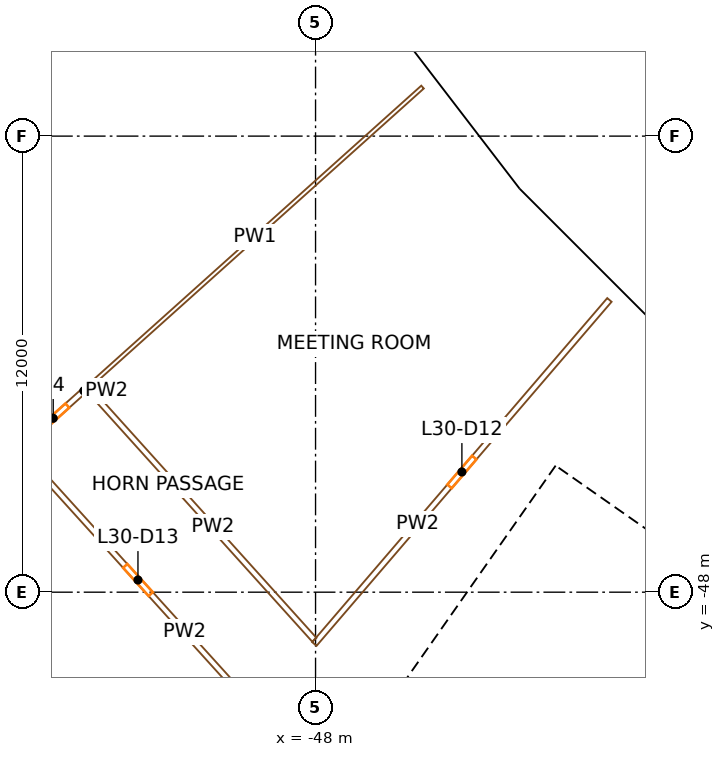
"""IFC4 building model, lengths in metres.
Left out: names, types, materials, properties, quantities, classifications, styles, units other than length and angle.
Written with IfcOpenShell. Run it as: python <this file> out.ifc"""

import sys

from ifc_helpers import new_model, si_unit, direction, frame, frame_2d, origin, origin_2d, place, context, subcontext, project, spatial, rectangle, extrude, element, fill, save


model = new_model("IFC4")
c1 = context("Model", 3, precision=1e-05, world=origin(), true_north=direction((0.0, 1.0)))
c2 = subcontext(c1, "Body", "Model", "MODEL_VIEW")
j1 = project(units=[si_unit("LENGTHUNIT", "METRE"), si_unit("PLANEANGLEUNIT", "RADIAN")], contexts=[c1])
p1 = place(None, origin())
s1 = spatial("IfcSite", under=j1, at=p1, CompositionType="ELEMENT")
p2 = place(p1, origin())
s2 = spatial("IfcBuilding", under=s1, at=p2, CompositionType="ELEMENT")
p3 = place(p2, frame((0.0, 0.0, 132.9)))
s3 = spatial("IfcBuildingStorey", under=s2, at=p3, CompositionType="ELEMENT", Elevation=132.9)
for number, where, z_axis, x_axis in (
    (1, (-43.795, -38.407, 0.0), (0.0, 0.0, 1.0), (0.659, -0.752, 0.0)),
    (2, (-38.407, -43.795, 0.0), (0.0, 0.0, 1.0), (0.752, -0.659, 0.0)),
):
    element("IfcColumn", number, at=place(p3, frame(where, z_axis=z_axis, x_axis=x_axis)), inside=s3, PredefinedType="COLUMN", context=c2, shape_type="SweptSolid", body=[
        extrude(rectangle(XDim=1.2, YDim=1.5, at=origin_2d()), origin(), (0.0, 0.0, 1.0), 3.8),
    ])
p4 = place(p3, frame((-49.779, -57.191, 0.0), z_axis=(0.0, 0.0, 1.0), x_axis=(0.573577477574, 0.819151315216, 0.0)))
e3 = element("IfcWall", 3, at=p4, inside=s3, PredefinedType="SHEAR", context=c2, shape_type="SweptSolid", body=[
    extrude(rectangle(XDim=14.8, YDim=0.9, at=frame_2d((7.4, 0.0))), origin(), (0.0, 0.0, 1.0), 3.5),
])
p5 = place(p4, frame((6.7, 0.0, 0.0)))
e4 = element("IfcOpeningElement", 4, at=p5, cuts=e3, PredefinedType="OPENING", context=c2, shape_type="SweptSolid", body=[
    extrude(rectangle(XDim=1.4, YDim=2.1, at=frame_2d((0.7, 1.05))), frame((0.0, 0.46, 0.0), z_axis=(0.0, -1.0, 0.0), x_axis=(1.0, 0.0, 0.0)), (0.0, 0.0, 1.0), 0.92),
])
p6 = place(p3, frame((-28.854, -54.324, 0.0), z_axis=(0.0, 0.0, 1.0), x_axis=(-0.819145767589, 0.573585400304, 0.0)))
e5 = element("IfcWall", 5, at=p6, inside=s3, PredefinedType="SHEAR", context=c2, shape_type="SweptSolid", body=[
    extrude(rectangle(XDim=15.045, YDim=0.9, at=frame_2d((7.523, 0.0))), origin(), (0.0, 0.0, 1.0), 3.5),
])
p7 = place(p6, frame((0.5, 0.0, 0.0)))
e6 = element("IfcOpeningElement", 6, at=p7, cuts=e5, PredefinedType="OPENING", context=c2, shape_type="SweptSolid", body=[
    extrude(rectangle(XDim=1.0, YDim=2.1, at=frame_2d((0.5, 1.05))), frame((0.0, 0.46, 0.0), z_axis=(0.0, -1.0, 0.0), x_axis=(1.0, 0.0, 0.0)), (0.0, 0.0, 1.0), 0.92),
])
p8 = place(p6, frame((2.625, 0.0, 0.0)))
e7 = element("IfcOpeningElement", 7, at=p8, cuts=e5, PredefinedType="OPENING", context=c2, shape_type="SweptSolid", body=[
    extrude(rectangle(XDim=1.0, YDim=2.1, at=frame_2d((0.5, 1.05))), frame((0.0, 0.46, 0.0), z_axis=(0.0, -1.0, 0.0), x_axis=(1.0, 0.0, 0.0)), (0.0, 0.0, 1.0), 0.92),
])
p9 = place(p6, frame((5.625, 0.0, 0.0)))
e8 = element("IfcOpeningElement", 8, at=p9, cuts=e5, PredefinedType="OPENING", context=c2, shape_type="SweptSolid", body=[
    extrude(rectangle(XDim=0.9, YDim=2.1, at=frame_2d((0.45, 1.05))), frame((0.0, 0.46, 0.0), z_axis=(0.0, -1.0, 0.0), x_axis=(1.0, 0.0, 0.0)), (0.0, 0.0, 1.0), 0.92),
])
p10 = place(p6, frame((13.495, 0.0, 0.0)))
e9 = element("IfcOpeningElement", 9, at=p10, cuts=e5, PredefinedType="OPENING", context=c2, shape_type="SweptSolid", body=[
    extrude(rectangle(XDim=1.1, YDim=2.1, at=frame_2d((0.55, 1.05))), frame((0.0, 0.46, 0.0), z_axis=(0.0, -1.0, 0.0), x_axis=(1.0, 0.0, 0.0)), (0.0, 0.0, 1.0), 0.92),
])
p11 = place(p3, frame((-43.204, -60.696, 0.0), z_axis=(0.0, 0.0, 1.0), x_axis=(0.573571992966, 0.819155155563, 0.0)))
e10 = element("IfcWall", 10, at=p11, inside=s3, PredefinedType="SOLIDWALL", context=c2, shape_type="SweptSolid", body=[
    extrude(rectangle(XDim=13.0, YDim=0.3, at=frame_2d((6.5, 0.0))), origin(), (0.0, 0.0, 1.0), 3.5),
])
p12 = place(p3, frame((-37.936, -52.91, 0.0), z_axis=(0.0, 0.0, 1.0), x_axis=(-0.819147518138, 0.57358290031, 0.0)))
e11 = element("IfcWall", 11, at=p12, inside=s3, PredefinedType="SOLIDWALL", context=c2, shape_type="SweptSolid", body=[
    extrude(rectangle(XDim=6.795, YDim=0.3, at=frame_2d((3.398, 0.0))), origin(), (0.0, 0.0, 1.0), 3.5),
])
p13 = place(p12, frame((5.32, 0.0, 0.0)))
e12 = element("IfcOpeningElement", 12, at=p13, cuts=e11, PredefinedType="OPENING", context=c2, shape_type="SweptSolid", body=[
    extrude(rectangle(XDim=1.1, YDim=2.1, at=frame_2d((0.55, 1.05))), frame((0.0, 0.16, 0.0), z_axis=(0.0, -1.0, 0.0), x_axis=(1.0, 0.0, 0.0)), (0.0, 0.0, 1.0), 0.32),
])
p14 = place(p3, frame((-42.765, -37.537, 0.0), z_axis=(0.0, 0.0, 1.0), x_axis=(-0.608748204711, 0.793363487476, 0.0)))
e13 = element("IfcWall", 13, at=p14, inside=s3, PredefinedType="SOLIDWALL", context=c2, shape_type="SweptSolid", body=[
    extrude(rectangle(XDim=7.493, YDim=0.4, at=frame_2d((3.747, 0.0))), origin(), (0.0, 0.0, 1.0), 2.7),
])
p15 = place(p14, frame((4.301, 0.0, 0.9)))
e14 = element("IfcOpeningElement", 14, at=p15, cuts=e13, PredefinedType="OPENING", context=c2, shape_type="SweptSolid", body=[
    extrude(rectangle(XDim=2.6, YDim=1.65, at=frame_2d((1.3, 0.825))), frame((0.0, 0.21, 0.0), z_axis=(0.0, -1.0, 0.0), x_axis=(1.0, 0.0, 0.0)), (0.0, 0.0, 1.0), 0.42),
])
p16 = place(p14, frame((0.592, 0.0, 0.9)))
e15 = element("IfcOpeningElement", 15, at=p16, cuts=e13, PredefinedType="OPENING", context=c2, shape_type="SweptSolid", body=[
    extrude(rectangle(XDim=2.6, YDim=1.65, at=frame_2d((1.3, 0.825))), frame((0.0, 0.21, 0.0), z_axis=(0.0, -1.0, 0.0), x_axis=(1.0, 0.0, 0.0)), (0.0, 0.0, 1.0), 0.42),
])
p17 = place(p3, frame((-37.553, -42.744, 0.0), z_axis=(0.0, 0.0, 1.0), x_axis=(-0.707106781187, 0.707106781187, 0.0)))
e16 = element("IfcWall", 16, at=p17, inside=s3, PredefinedType="SOLIDWALL", context=c2, shape_type="SweptSolid", body=[
    extrude(rectangle(XDim=7.341, YDim=0.4, at=frame_2d((3.671, 0.0))), origin(), (0.0, 0.0, 1.0), 2.7),
])
p18 = place(p17, frame((4.225, 0.0, 0.9)))
e17 = element("IfcOpeningElement", 17, at=p18, cuts=e16, PredefinedType="OPENING", context=c2, shape_type="SweptSolid", body=[
    extrude(rectangle(XDim=2.6, YDim=1.65, at=frame_2d((1.3, 0.825))), frame((0.0, 0.21, 0.0), z_axis=(0.0, -1.0, 0.0), x_axis=(1.0, 0.0, 0.0)), (0.0, 0.0, 1.0), 0.42),
])
p19 = place(p17, frame((0.517, 0.0, 0.9)))
e18 = element("IfcOpeningElement", 18, at=p19, cuts=e16, PredefinedType="OPENING", context=c2, shape_type="SweptSolid", body=[
    extrude(rectangle(XDim=2.6, YDim=1.65, at=frame_2d((1.3, 0.825))), frame((0.0, 0.21, 0.0), z_axis=(0.0, -1.0, 0.0), x_axis=(1.0, 0.0, 0.0)), (0.0, 0.0, 1.0), 0.42),
])
p20 = place(p3, frame((-55.798, -44.227, 0.0), z_axis=(0.0, 0.0, 1.0), x_axis=(0.744539856865, 0.667578011576, 0.0)))
e19 = element("IfcWall", 19, at=p20, inside=s3, PredefinedType="PARTITIONING", context=c2, shape_type="SweptSolid", body=[
    extrude(rectangle(XDim=2.405, YDim=0.15, at=frame_2d((1.202, 0.0))), origin(), (0.0, 0.0, 1.0), 2.4),
])
p21 = place(p20, frame((0.702, 0.0, 0.0)))
e20 = element("IfcOpeningElement", 20, at=p21, cuts=e19, PredefinedType="OPENING", context=c2, shape_type="SweptSolid", body=[
    extrude(rectangle(XDim=1.0, YDim=2.1, at=frame_2d((0.5, 1.05))), frame((0.0, 0.085, 0.0), z_axis=(0.0, -1.0, 0.0), x_axis=(1.0, 0.0, 0.0)), (0.0, 0.0, 1.0), 0.17),
])
p22 = place(p3, frame((-54.008, -42.622, 0.0), z_axis=(0.0, 0.0, 1.0), x_axis=(0.744502704069, 0.667619445219, 0.0)))
e21 = element("IfcWall", 21, at=p22, inside=s3, PredefinedType="PARTITIONING", context=c2, shape_type="SweptSolid", body=[
    extrude(rectangle(XDim=11.851, YDim=0.1, at=frame_2d((5.925, 0.0))), origin(), (0.0, 0.0, 1.0), 2.4),
])
p23 = place(p3, frame((-49.598, -51.076, 0.0), z_axis=(0.0, 0.0, 1.0), x_axis=(-0.671105149511, 0.741362177549, 0.0)))
e22 = element("IfcWall", 22, at=p23, inside=s3, PredefinedType="PARTITIONING", context=c2, shape_type="SweptSolid", body=[
    extrude(rectangle(XDim=9.164, YDim=0.15, at=frame_2d((4.582, 0.0))), origin(), (0.0, 0.0, 1.0), 2.4),
])
p24 = place(p23, frame((4.082, 0.0, 0.0)))
e23 = element("IfcOpeningElement", 23, at=p24, cuts=e22, PredefinedType="OPENING", context=c2, shape_type="SweptSolid", body=[
    extrude(rectangle(XDim=1.0, YDim=2.1, at=frame_2d((0.5, 1.05))), frame((0.0, 0.085, 0.0), z_axis=(0.0, -1.0, 0.0), x_axis=(1.0, 0.0, 0.0)), (0.0, 0.0, 1.0), 0.17),
])
p25 = place(p3, frame((-48.032, -49.251, 0.0), z_axis=(0.0, 0.0, 1.0), x_axis=(-0.669505645027, 0.742806967709, 0.0)))
e24 = element("IfcWall", 24, at=p25, inside=s3, PredefinedType="PARTITIONING", context=c2, shape_type="SweptSolid", body=[
    extrude(rectangle(XDim=8.85, YDim=0.15, at=frame_2d((4.425, 0.0))), origin(), (0.0, 0.0, 1.0), 2.4),
])
p26 = place(p3, frame((-48.031, -49.364, 0.0), z_axis=(0.0, 0.0, 1.0), x_axis=(0.650981860867, 0.759093285982, 0.0)))
e25 = element("IfcWall", 25, at=p26, inside=s3, PredefinedType="PARTITIONING", context=c2, shape_type="SweptSolid", body=[
    extrude(rectangle(XDim=11.926, YDim=0.15, at=frame_2d((5.963, 0.0))), origin(), (0.0, 0.0, 1.0), 2.4),
])
p27 = place(p26, frame((5.463, 0.0, 0.0)))
e26 = element("IfcOpeningElement", 26, at=p27, cuts=e25, PredefinedType="OPENING", context=c2, shape_type="SweptSolid", body=[
    extrude(rectangle(XDim=1.0, YDim=2.1, at=frame_2d((0.5, 1.05))), frame((0.0, 0.085, 0.0), z_axis=(0.0, -1.0, 0.0), x_axis=(1.0, 0.0, 0.0)), (0.0, 0.0, 1.0), 0.17),
])
p28 = place(p10, origin())
e27 = element("IfcDoor", 27, at=p28, inside=s3, OperationType="SINGLE_SWING_RIGHT", PredefinedType="DOOR", context=c2, shape_type="SweptSolid", body=[
    extrude(rectangle(XDim=1.1, YDim=2.1, at=frame_2d((0.55, 1.05))), frame((0.0, 0.025, 0.0), z_axis=(0.0, -1.0, 0.0), x_axis=(1.0, 0.0, 0.0)), (0.0, 0.0, 1.0), 0.05),
])
fill(e9, e27)
p29 = place(p13, origin())
e28 = element("IfcDoor", 28, at=p29, inside=s3, OperationType="SINGLE_SWING_LEFT", PredefinedType="DOOR", context=c2, shape_type="SweptSolid", body=[
    extrude(rectangle(XDim=1.1, YDim=2.1, at=frame_2d((0.55, 1.05))), frame((0.0, 0.025, 0.0), z_axis=(0.0, -1.0, 0.0), x_axis=(1.0, 0.0, 0.0)), (0.0, 0.0, 1.0), 0.05),
])
fill(e12, e28)
p30 = place(p15, origin())
e29 = element("IfcWindow", 29, at=p30, inside=s3, PartitioningType="SINGLE_PANEL", PredefinedType="WINDOW", context=c2, shape_type="SweptSolid", body=[
    extrude(rectangle(XDim=2.6, YDim=1.65, at=frame_2d((1.3, 0.825))), frame((0.0, 0.03, 0.0), z_axis=(0.0, -1.0, 0.0), x_axis=(1.0, 0.0, 0.0)), (0.0, 0.0, 1.0), 0.06),
])
fill(e14, e29)
p31 = place(p16, origin())
e30 = element("IfcWindow", 30, at=p31, inside=s3, PartitioningType="SINGLE_PANEL", PredefinedType="WINDOW", context=c2, shape_type="SweptSolid", body=[
    extrude(rectangle(XDim=2.6, YDim=1.65, at=frame_2d((1.3, 0.825))), frame((0.0, 0.03, 0.0), z_axis=(0.0, -1.0, 0.0), x_axis=(1.0, 0.0, 0.0)), (0.0, 0.0, 1.0), 0.06),
])
fill(e15, e30)
p32 = place(p18, origin())
e31 = element("IfcWindow", 31, at=p32, inside=s3, PartitioningType="SINGLE_PANEL", PredefinedType="WINDOW", context=c2, shape_type="SweptSolid", body=[
    extrude(rectangle(XDim=2.6, YDim=1.65, at=frame_2d((1.3, 0.825))), frame((0.0, 0.03, 0.0), z_axis=(0.0, -1.0, 0.0), x_axis=(1.0, 0.0, 0.0)), (0.0, 0.0, 1.0), 0.06),
])
fill(e17, e31)
p33 = place(p19, origin())
e32 = element("IfcWindow", 32, at=p33, inside=s3, PartitioningType="SINGLE_PANEL", PredefinedType="WINDOW", context=c2, shape_type="SweptSolid", body=[
    extrude(rectangle(XDim=2.6, YDim=1.65, at=frame_2d((1.3, 0.825))), frame((0.0, 0.03, 0.0), z_axis=(0.0, -1.0, 0.0), x_axis=(1.0, 0.0, 0.0)), (0.0, 0.0, 1.0), 0.06),
])
fill(e18, e32)
p34 = place(p27, origin())
e33 = element("IfcDoor", 33, at=p34, inside=s3, OperationType="SINGLE_SWING_RIGHT", PredefinedType="DOOR", context=c2, shape_type="SweptSolid", body=[
    extrude(rectangle(XDim=1.0, YDim=2.1, at=frame_2d((0.5, 1.05))), frame((0.0, 0.025, 0.0), z_axis=(0.0, -1.0, 0.0), x_axis=(1.0, 0.0, 0.0)), (0.0, 0.0, 1.0), 0.05),
])
fill(e26, e33)
p35 = place(p24, origin())
e34 = element("IfcDoor", 34, at=p35, inside=s3, OperationType="SINGLE_SWING_RIGHT", PredefinedType="DOOR", context=c2, shape_type="SweptSolid", body=[
    extrude(rectangle(XDim=1.0, YDim=2.1, at=frame_2d((0.5, 1.05))), frame((0.0, 0.025, 0.0), z_axis=(0.0, -1.0, 0.0), x_axis=(1.0, 0.0, 0.0)), (0.0, 0.0, 1.0), 0.05),
])
fill(e23, e34)
p36 = place(p21, origin())
e35 = element("IfcDoor", 35, at=p36, inside=s3, OperationType="SINGLE_SWING_RIGHT", PredefinedType="DOOR", context=c2, shape_type="SweptSolid", body=[
    extrude(rectangle(XDim=1.0, YDim=2.1, at=frame_2d((0.5, 1.05))), frame((0.0, 0.025, 0.0), z_axis=(0.0, -1.0, 0.0), x_axis=(1.0, 0.0, 0.0)), (0.0, 0.0, 1.0), 0.05),
])
fill(e20, e35)
save(model, sys.argv[1])
